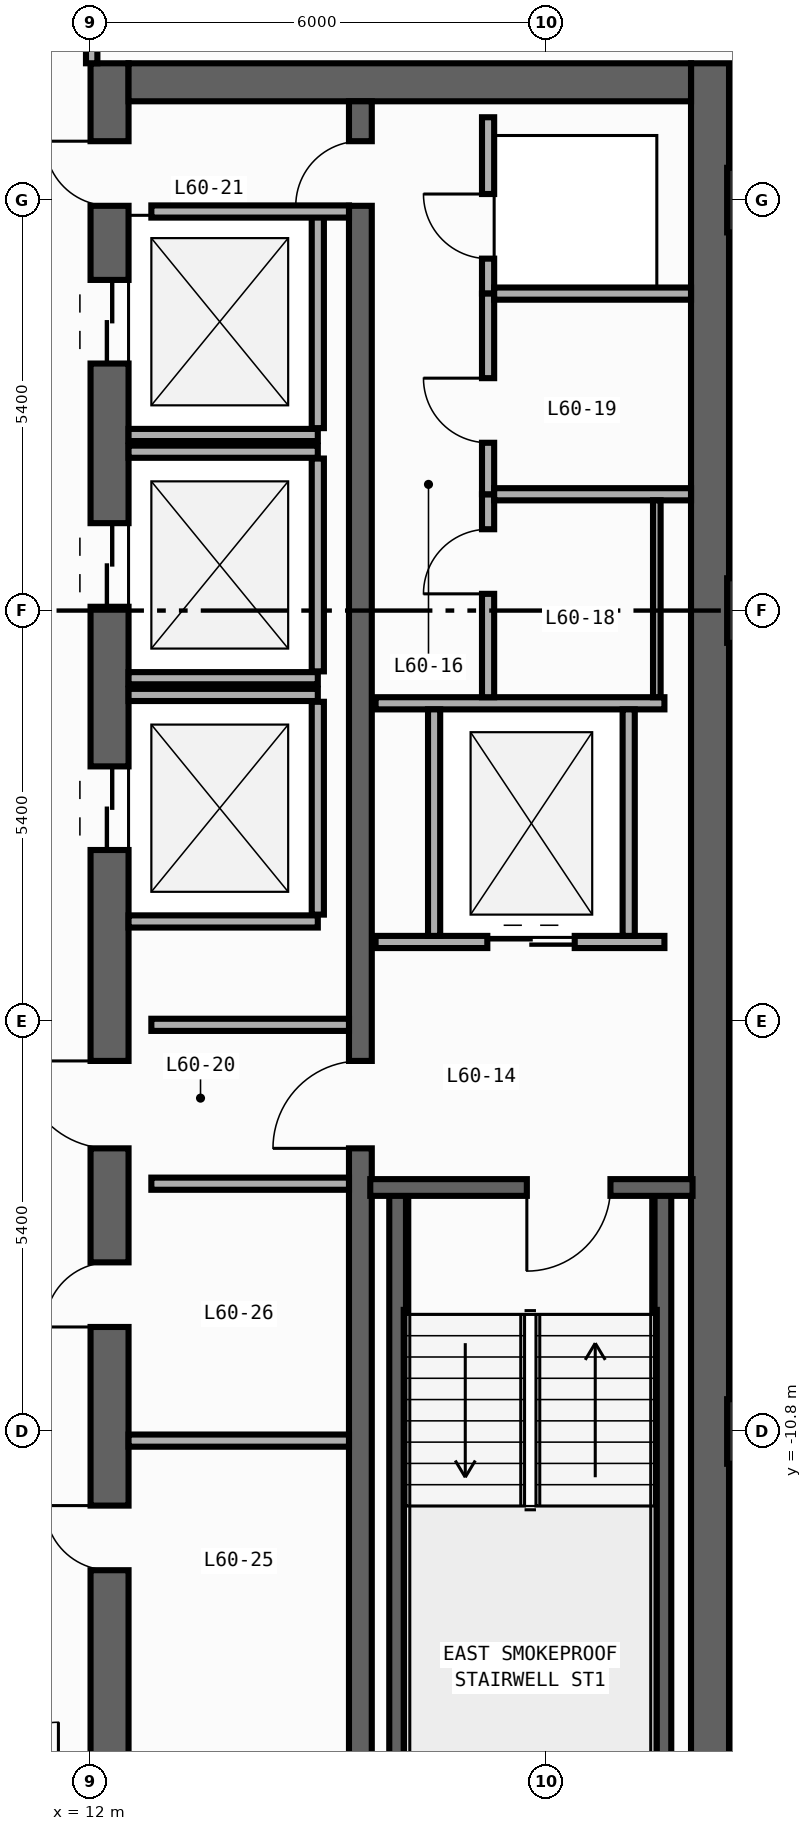
"""IFC4 building model, lengths in metres.
Left out: names, types, materials, properties, quantities, classifications, styles, units other than length and angle.
Written with IfcOpenShell. Run it as: python <this file> out.ifc"""

import sys

from ifc_helpers import new_model, si_unit, direction, frame, frame_2d, origin, origin_2d, place, context, subcontext, project, spatial, rectangle, extrude, element, fill, save


model = new_model("IFC4")
c1 = context("Model", 3, precision=1e-05, world=origin(), true_north=direction((0.0, 1.0)))
c2 = subcontext(c1, "Body", "Model", "MODEL_VIEW")
j1 = project(units=[si_unit("LENGTHUNIT", "METRE"), si_unit("PLANEANGLEUNIT", "RADIAN")], contexts=[c1])
p1 = place(None, origin())
s1 = spatial("IfcSite", under=j1, at=p1, CompositionType="ELEMENT")
p2 = place(p1, origin())
s2 = spatial("IfcBuilding", under=s1, at=p2, CompositionType="ELEMENT")
p3 = place(p2, frame((0.0, 0.0, 254.8)))
s3 = spatial("IfcBuildingStorey", under=s2, at=p3, CompositionType="ELEMENT", Elevation=254.8)
p4 = place(p3, frame((12.25, -19.8, 0.0), z_axis=(0.0, 0.0, 1.0), x_axis=(0.0, 1.0, 0.0)))
e1 = element("IfcWall", 1, at=p4, inside=s3, PredefinedType="SHEAR", context=c2, shape_type="SweptSolid", body=[
    extrude(rectangle(XDim=27.0, YDim=0.5, at=frame_2d((13.5, 0.0))), origin(), (0.0, 0.0, 1.0), 3.34),
])
p5 = place(p4, frame((23.05, 0.0, 0.0)))
e2 = element("IfcOpeningElement", 2, at=p5, cuts=e1, PredefinedType="OPENING", context=c2, shape_type="SweptSolid", body=[
    extrude(rectangle(XDim=1.1, YDim=2.2, at=frame_2d((0.55, 1.1))), frame((0.0, 0.26, 0.0), z_axis=(0.0, -1.0, 0.0), x_axis=(1.0, 0.0, 0.0)), (0.0, 0.0, 1.0), 0.52),
])
p6 = place(p4, frame((19.85, 0.0, 0.0)))
e3 = element("IfcOpeningElement", 3, at=p6, cuts=e1, PredefinedType="OPENING", context=c2, shape_type="SweptSolid", body=[
    extrude(rectangle(XDim=1.1, YDim=2.2, at=frame_2d((0.55, 1.1))), frame((0.0, 0.26, 0.0), z_axis=(0.0, -1.0, 0.0), x_axis=(1.0, 0.0, 0.0)), (0.0, 0.0, 1.0), 0.52),
])
p7 = place(p4, frame((16.65, 0.0, 0.0)))
e4 = element("IfcOpeningElement", 4, at=p7, cuts=e1, PredefinedType="OPENING", context=c2, shape_type="SweptSolid", body=[
    extrude(rectangle(XDim=1.1, YDim=2.2, at=frame_2d((0.55, 1.1))), frame((0.0, 0.26, 0.0), z_axis=(0.0, -1.0, 0.0), x_axis=(1.0, 0.0, 0.0)), (0.0, 0.0, 1.0), 0.52),
])
p8 = place(p4, frame((7.175, 0.0, 0.0)))
e5 = element("IfcOpeningElement", 5, at=p8, cuts=e1, PredefinedType="OPENING", context=c2, shape_type="SweptSolid", body=[
    extrude(rectangle(XDim=0.85, YDim=2.1, at=frame_2d((0.425, 1.05))), frame((0.0, 0.26, 0.0), z_axis=(0.0, -1.0, 0.0), x_axis=(1.0, 0.0, 0.0)), (0.0, 0.0, 1.0), 0.52),
])
p9 = place(p4, frame((10.375, 0.0, 0.0)))
e6 = element("IfcOpeningElement", 6, at=p9, cuts=e1, PredefinedType="OPENING", context=c2, shape_type="SweptSolid", body=[
    extrude(rectangle(XDim=0.85, YDim=2.1, at=frame_2d((0.425, 1.05))), frame((0.0, 0.26, 0.0), z_axis=(0.0, -1.0, 0.0), x_axis=(1.0, 0.0, 0.0)), (0.0, 0.0, 1.0), 0.52),
])
p10 = place(p4, frame((12.725, 0.0, 0.0)))
e7 = element("IfcOpeningElement", 7, at=p10, cuts=e1, PredefinedType="OPENING", context=c2, shape_type="SweptSolid", body=[
    extrude(rectangle(XDim=1.15, YDim=2.2, at=frame_2d((0.575, 1.1))), frame((0.0, 0.26, 0.0), z_axis=(0.0, -1.0, 0.0), x_axis=(1.0, 0.0, 0.0)), (0.0, 0.0, 1.0), 0.52),
])
p11 = place(p4, frame((25.125, 0.0, 0.0)))
e8 = element("IfcOpeningElement", 8, at=p11, cuts=e1, PredefinedType="OPENING", context=c2, shape_type="SweptSolid", body=[
    extrude(rectangle(XDim=0.85, YDim=2.1, at=frame_2d((0.425, 1.05))), frame((0.0, 0.26, 0.0), z_axis=(0.0, -1.0, 0.0), x_axis=(1.0, 0.0, 0.0)), (0.0, 0.0, 1.0), 0.52),
])
p12 = place(p3, frame((20.15, -19.8, 0.0), z_axis=(0.0, 0.0, 1.0), x_axis=(0.0, 1.0, 0.0)))
e9 = element("IfcWall", 9, at=p12, inside=s3, PredefinedType="SHEAR", context=c2, shape_type="SweptSolid", body=[
    extrude(rectangle(XDim=27.0, YDim=0.5, at=frame_2d((13.5, 0.0))), origin(), (0.0, 0.0, 1.0), 3.34),
])
p13 = place(p3, frame((12.5, 6.95, 0.0), z_axis=(0.0, 0.0, 1.0), x_axis=(1.0, 0.0, 0.0)))
e10 = element("IfcWall", 10, at=p13, inside=s3, PredefinedType="SHEAR", context=c2, shape_type="SweptSolid", body=[
    extrude(rectangle(XDim=7.4, YDim=0.5, at=frame_2d((3.7, 0.0))), origin(), (0.0, 0.0, 1.0), 3.34),
])
p14 = place(p3, frame((15.55, -19.3, 0.0), z_axis=(0.0, 0.0, 1.0), x_axis=(0.0, 1.0, 0.0)))
e11 = element("IfcWall", 11, at=p14, inside=s3, PredefinedType="SHEAR", context=c2, shape_type="SweptSolid", body=[
    extrude(rectangle(XDim=26.0, YDim=0.3, at=frame_2d((13.0, 0.0))), origin(), (0.0, 0.0, 1.0), 3.34),
])
p15 = place(p14, frame((12.225, 0.0, 0.0)))
e12 = element("IfcOpeningElement", 12, at=p15, cuts=e11, PredefinedType="OPENING", context=c2, shape_type="SweptSolid", body=[
    extrude(rectangle(XDim=1.15, YDim=2.2, at=frame_2d((0.575, 1.1))), frame((0.0, 0.16, 0.0), z_axis=(0.0, -1.0, 0.0), x_axis=(1.0, 0.0, 0.0)), (0.0, 0.0, 1.0), 0.32),
])
p16 = place(p14, frame((24.625, 0.0, 0.0)))
e13 = element("IfcOpeningElement", 13, at=p16, cuts=e11, PredefinedType="OPENING", context=c2, shape_type="SweptSolid", body=[
    extrude(rectangle(XDim=0.85, YDim=2.1, at=frame_2d((0.425, 1.05))), frame((0.0, 0.16, 0.0), z_axis=(0.0, -1.0, 0.0), x_axis=(1.0, 0.0, 0.0)), (0.0, 0.0, 1.0), 0.32),
])
for number, where, z_axis, x_axis in (
    (14, (16.04, -19.01, 0.0), (0.0, 0.0, 1.0), (0.0, 1.0, 0.0)),
    (15, (19.53, -19.01, 0.0), (0.0, 0.0, 1.0), (0.0, 1.0, 0.0)),
):
    element("IfcWall", number, at=place(p3, frame(where, z_axis=z_axis, x_axis=x_axis)), inside=s3, PredefinedType="SHEAR", context=c2, shape_type="SweptSolid", body=[
        extrude(rectangle(XDim=11.42, YDim=0.22, at=frame_2d((5.71, 0.0))), origin(), (0.0, 0.0, 1.0), 3.34),
    ])
p17 = place(p3, frame((19.92, -7.59, 0.0), z_axis=(0.0, 0.0, 1.0), x_axis=(-1.0, 0.0, 0.0)))
e16 = element("IfcWall", 16, at=p17, inside=s3, PredefinedType="SHEAR", context=c2, shape_type="SweptSolid", body=[
    extrude(rectangle(XDim=4.24, YDim=0.22, at=frame_2d((2.12, 0.0))), origin(), (0.0, 0.0, 1.0), 3.34),
])
p18 = place(p17, frame((1.08, 0.0, 0.0)))
e17 = element("IfcOpeningElement", 17, at=p18, cuts=e16, PredefinedType="OPENING", context=c2, shape_type="SweptSolid", body=[
    extrude(rectangle(XDim=1.1, YDim=2.2, at=frame_2d((0.55, 1.1))), frame((0.0, 0.12, 0.0), z_axis=(0.0, -1.0, 0.0), x_axis=(1.0, 0.0, 0.0)), (0.0, 0.0, 1.0), 0.24),
])
for number, where, z_axis, x_axis in (
    (18, (20.8, -10.8, 0.0), (0.0, 0.0, 1.0), (1.0, 0.0, 0.0)),
    (19, (20.8, 0.0, 0.0), (0.0, 0.0, 1.0), (1.0, 0.0, 0.0)),
    (20, (20.8, 5.4, 0.0), (0.0, 0.0, 1.0), (1.0, 0.0, 0.0)),
):
    element("IfcColumn", number, at=place(p3, frame(where, z_axis=z_axis, x_axis=x_axis)), inside=s3, PredefinedType="COLUMN", context=c2, shape_type="SweptSolid", body=[
        extrude(rectangle(XDim=0.85, YDim=0.85, at=origin_2d()), origin(), (0.0, 0.0, 1.0), 3.6),
    ])
p19 = place(p3, frame((12.5, 2.31, 0.0), z_axis=(0.0, 0.0, 1.0), x_axis=(1.0, 0.0, 0.0)))
e21 = element("IfcWall", 21, at=p19, inside=s3, PredefinedType="STANDARD", context=c2, shape_type="SweptSolid", body=[
    extrude(rectangle(XDim=2.49, YDim=0.16, at=frame_2d((1.245, 0.0))), origin(), (0.0, 0.0, 1.0), 3.34),
])
p20 = place(p3, frame((14.99, 2.4, 0.0), z_axis=(0.0, 0.0, 1.0), x_axis=(0.0, 1.0, 0.0)))
e22 = element("IfcWall", 22, at=p20, inside=s3, PredefinedType="STANDARD", context=c2, shape_type="SweptSolid", body=[
    extrude(rectangle(XDim=2.8, YDim=0.16, at=frame_2d((1.4, 0.0))), origin(), (0.0, 0.0, 1.0), 3.34),
])
for number, where, z_axis, x_axis in (
    (23, (12.5, -0.89, 0.0), (0.0, 0.0, 1.0), (1.0, 0.0, 0.0)),
    (24, (12.5, 2.09, 0.0), (0.0, 0.0, 1.0), (1.0, 0.0, 0.0)),
):
    element("IfcWall", number, at=place(p3, frame(where, z_axis=z_axis, x_axis=x_axis)), inside=s3, PredefinedType="STANDARD", context=c2, shape_type="SweptSolid", body=[
        extrude(rectangle(XDim=2.49, YDim=0.16, at=frame_2d((1.245, 0.0))), origin(), (0.0, 0.0, 1.0), 3.34),
    ])
p21 = place(p3, frame((14.99, -0.8, 0.0), z_axis=(0.0, 0.0, 1.0), x_axis=(0.0, 1.0, 0.0)))
e25 = element("IfcWall", 25, at=p21, inside=s3, PredefinedType="STANDARD", context=c2, shape_type="SweptSolid", body=[
    extrude(rectangle(XDim=2.8, YDim=0.16, at=frame_2d((1.4, 0.0))), origin(), (0.0, 0.0, 1.0), 3.34),
])
for number, where, z_axis, x_axis in (
    (26, (12.5, -4.09, 0.0), (0.0, 0.0, 1.0), (1.0, 0.0, 0.0)),
    (27, (12.5, -1.11, 0.0), (0.0, 0.0, 1.0), (1.0, 0.0, 0.0)),
):
    element("IfcWall", number, at=place(p3, frame(where, z_axis=z_axis, x_axis=x_axis)), inside=s3, PredefinedType="STANDARD", context=c2, shape_type="SweptSolid", body=[
        extrude(rectangle(XDim=2.49, YDim=0.16, at=frame_2d((1.245, 0.0))), origin(), (0.0, 0.0, 1.0), 3.34),
    ])
p22 = place(p3, frame((14.99, -4.0, 0.0), z_axis=(0.0, 0.0, 1.0), x_axis=(0.0, 1.0, 0.0)))
e28 = element("IfcWall", 28, at=p22, inside=s3, PredefinedType="STANDARD", context=c2, shape_type="SweptSolid", body=[
    extrude(rectangle(XDim=2.8, YDim=0.16, at=frame_2d((1.4, 0.0))), origin(), (0.0, 0.0, 1.0), 3.34),
])
p23 = place(p3, frame((15.75, -4.36, 0.0), z_axis=(0.0, 0.0, 1.0), x_axis=(1.0, 0.0, 0.0)))
e29 = element("IfcWall", 29, at=p23, inside=s3, PredefinedType="STANDARD", context=c2, shape_type="SweptSolid", body=[
    extrude(rectangle(XDim=3.8, YDim=0.16, at=frame_2d((1.9, 0.0))), origin(), (0.0, 0.0, 1.0), 3.34),
])
p24 = place(p23, frame((1.47, 0.0, 0.0)))
e30 = element("IfcOpeningElement", 30, at=p24, cuts=e29, PredefinedType="OPENING", context=c2, shape_type="SweptSolid", body=[
    extrude(rectangle(XDim=1.15, YDim=2.2, at=frame_2d((0.575, 1.1))), frame((0.0, 0.09, 0.0), z_axis=(0.0, -1.0, 0.0), x_axis=(1.0, 0.0, 0.0)), (0.0, 0.0, 1.0), 0.18),
])
p25 = place(p3, frame((15.75, -1.22, 0.0), z_axis=(0.0, 0.0, 1.0), x_axis=(1.0, 0.0, 0.0)))
e31 = element("IfcWall", 31, at=p25, inside=s3, PredefinedType="STANDARD", context=c2, shape_type="SweptSolid", body=[
    extrude(rectangle(XDim=3.8, YDim=0.16, at=frame_2d((1.9, 0.0))), origin(), (0.0, 0.0, 1.0), 3.34),
])
for number, where, z_axis, x_axis in (
    (32, (16.52, -4.28, 0.0), (0.0, 0.0, 1.0), (0.0, 1.0, 0.0)),
    (33, (19.08, -4.28, 0.0), (0.0, 0.0, 1.0), (0.0, 1.0, 0.0)),
):
    element("IfcWall", number, at=place(p3, frame(where, z_axis=z_axis, x_axis=x_axis)), inside=s3, PredefinedType="STANDARD", context=c2, shape_type="SweptSolid", body=[
        extrude(rectangle(XDim=2.98, YDim=0.16, at=frame_2d((1.49, 0.0))), origin(), (0.0, 0.0, 1.0), 3.34),
    ])
for number, where, z_axis, x_axis in (
    (34, (12.8, -5.45, 0.0), (0.0, 0.0, 1.0), (1.0, 0.0, 0.0)),
    (35, (12.8, -7.54, 0.0), (0.0, 0.0, 1.0), (1.0, 0.0, 0.0)),
    (36, (12.8, 5.25, 0.0), (0.0, 0.0, 1.0), (1.0, 0.0, 0.0)),
):
    element("IfcWall", number, at=place(p3, frame(where, z_axis=z_axis, x_axis=x_axis)), inside=s3, PredefinedType="STANDARD", context=c2, shape_type="SweptSolid", body=[
        extrude(rectangle(XDim=2.6, YDim=0.16, at=frame_2d((1.3, 0.0))), origin(), (0.0, 0.0, 1.0), 3.34),
    ])
p26 = place(p3, frame((17.23, 4.17, 0.0), z_axis=(0.0, 0.0, 1.0), x_axis=(0.0, 1.0, 0.0)))
e37 = element("IfcWall", 37, at=p26, inside=s3, PredefinedType="PARTITIONING", context=c2, shape_type="SweptSolid", body=[
    extrude(rectangle(XDim=2.32, YDim=0.16, at=frame_2d((1.16, 0.0))), origin(), (0.0, 0.0, 1.0), 3.34),
])
p27 = place(p26, frame((0.46, 0.0, 0.0)))
e38 = element("IfcOpeningElement", 38, at=p27, cuts=e37, PredefinedType="OPENING", context=c2, shape_type="SweptSolid", body=[
    extrude(rectangle(XDim=0.85, YDim=2.1, at=frame_2d((0.425, 1.05))), frame((0.0, 0.09, 0.0), z_axis=(0.0, -1.0, 0.0), x_axis=(1.0, 0.0, 0.0)), (0.0, 0.0, 1.0), 0.18),
])
p28 = place(p3, frame((17.23, -1.14, 0.0), z_axis=(0.0, 0.0, 1.0), x_axis=(0.0, 1.0, 0.0)))
e39 = element("IfcWall", 39, at=p28, inside=s3, PredefinedType="PARTITIONING", context=c2, shape_type="SweptSolid", body=[
    extrude(rectangle(XDim=2.67, YDim=0.16, at=frame_2d((1.335, 0.0))), origin(), (0.0, 0.0, 1.0), 3.34),
])
p29 = place(p28, frame((1.36, 0.0, 0.0)))
e40 = element("IfcOpeningElement", 40, at=p29, cuts=e39, PredefinedType="OPENING", context=c2, shape_type="SweptSolid", body=[
    extrude(rectangle(XDim=0.85, YDim=2.1, at=frame_2d((0.425, 1.05))), frame((0.0, 0.09, 0.0), z_axis=(0.0, -1.0, 0.0), x_axis=(1.0, 0.0, 0.0)), (0.0, 0.0, 1.0), 0.18),
])
p30 = place(p3, frame((17.23, 1.53, 0.0), z_axis=(0.0, 0.0, 1.0), x_axis=(0.0, 1.0, 0.0)))
e41 = element("IfcWall", 41, at=p30, inside=s3, PredefinedType="PARTITIONING", context=c2, shape_type="SweptSolid", body=[
    extrude(rectangle(XDim=2.64, YDim=0.16, at=frame_2d((1.32, 0.0))), origin(), (0.0, 0.0, 1.0), 3.34),
])
p31 = place(p30, frame((0.677, 0.0, 0.0)))
e42 = element("IfcOpeningElement", 42, at=p31, cuts=e41, PredefinedType="OPENING", context=c2, shape_type="SweptSolid", body=[
    extrude(rectangle(XDim=0.85, YDim=2.1, at=frame_2d((0.425, 1.05))), frame((0.0, 0.09, 0.0), z_axis=(0.0, -1.0, 0.0), x_axis=(1.0, 0.0, 0.0)), (0.0, 0.0, 1.0), 0.18),
])
for number, where, z_axis, x_axis in (
    (43, (17.31, 4.17, 0.0), (0.0, 0.0, 1.0), (1.0, 0.0, 0.0)),
    (44, (17.31, 1.53, 0.0), (0.0, 0.0, 1.0), (1.0, 0.0, 0.0)),
):
    element("IfcWall", number, at=place(p3, frame(where, z_axis=z_axis, x_axis=x_axis)), inside=s3, PredefinedType="PARTITIONING", context=c2, shape_type="SweptSolid", body=[
        extrude(rectangle(XDim=2.59, YDim=0.16, at=frame_2d((1.295, 0.0))), origin(), (0.0, 0.0, 1.0), 3.34),
    ])
p32 = place(p3, frame((12.5, -10.92, 0.0), z_axis=(0.0, 0.0, 1.0), x_axis=(1.0, 0.0, 0.0)))
e45 = element("IfcWall", 45, at=p32, inside=s3, PredefinedType="PARTITIONING", context=c2, shape_type="SweptSolid", body=[
    extrude(rectangle(XDim=2.9, YDim=0.16, at=frame_2d((1.45, 0.0))), origin(), (0.0, 0.0, 1.0), 2.44),
])
p33 = place(p3, frame((12.015, 7.2, 0.0), z_axis=(0.0, 0.0, 1.0), x_axis=(0.0, 1.0, 0.0)))
e46 = element("IfcWall", 46, at=p33, inside=s3, PredefinedType="PARTITIONING", context=c2, shape_type="SweptSolid", body=[
    extrude(rectangle(XDim=6.52, YDim=0.15, at=frame_2d((3.26, 0.0))), origin(), (0.0, 0.0, 1.0), 3.34),
])
p34 = place(p33, frame((0.67, 0.0, 0.0)))
e47 = element("IfcOpeningElement", 47, at=p34, cuts=e46, PredefinedType="OPENING", context=c2, shape_type="SweptSolid", body=[
    extrude(rectangle(XDim=0.9, YDim=2.15, at=frame_2d((0.45, 1.075))), frame((0.0, 0.085, 0.0), z_axis=(0.0, -1.0, 0.0), x_axis=(1.0, 0.0, 0.0)), (0.0, 0.0, 1.0), 0.17),
])
p35 = place(p3, frame((19.45, 1.45, 0.0), z_axis=(0.0, 0.0, 1.0), x_axis=(0.0, -1.0, 0.0)))
e48 = element("IfcWall", 48, at=p35, inside=s3, PredefinedType="PARTITIONING", context=c2, shape_type="SweptSolid", body=[
    extrude(rectangle(XDim=2.59, YDim=0.1, at=frame_2d((1.295, 0.0))), origin(), (0.0, 0.0, 1.0), 3.34),
])
p36 = place(p18, origin())
e49 = element("IfcDoor", 49, at=p36, inside=s3, OperationType="SINGLE_SWING_RIGHT", PredefinedType="DOOR", context=c2, shape_type="SweptSolid", body=[
    extrude(rectangle(XDim=1.1, YDim=2.2, at=frame_2d((0.55, 1.1))), frame((0.0, 0.025, 0.0), z_axis=(0.0, -1.0, 0.0), x_axis=(1.0, 0.0, 0.0)), (0.0, 0.0, 1.0), 0.05),
])
fill(e17, e49)
p37 = place(p5, origin())
e50 = element("IfcDoor", 50, at=p37, inside=s3, OperationType="DOUBLE_DOOR_SLIDING", PredefinedType="DOOR", context=c2, shape_type="SweptSolid", body=[
    extrude(rectangle(XDim=1.1, YDim=2.2, at=frame_2d((0.55, 1.1))), frame((0.0, 0.025, 0.0), z_axis=(0.0, -1.0, 0.0), x_axis=(1.0, 0.0, 0.0)), (0.0, 0.0, 1.0), 0.05),
])
fill(e2, e50)
p38 = place(p6, origin())
e51 = element("IfcDoor", 51, at=p38, inside=s3, OperationType="DOUBLE_DOOR_SLIDING", PredefinedType="DOOR", context=c2, shape_type="SweptSolid", body=[
    extrude(rectangle(XDim=1.1, YDim=2.2, at=frame_2d((0.55, 1.1))), frame((0.0, 0.025, 0.0), z_axis=(0.0, -1.0, 0.0), x_axis=(1.0, 0.0, 0.0)), (0.0, 0.0, 1.0), 0.05),
])
fill(e3, e51)
p39 = place(p7, origin())
e52 = element("IfcDoor", 52, at=p39, inside=s3, OperationType="DOUBLE_DOOR_SLIDING", PredefinedType="DOOR", context=c2, shape_type="SweptSolid", body=[
    extrude(rectangle(XDim=1.1, YDim=2.2, at=frame_2d((0.55, 1.1))), frame((0.0, 0.025, 0.0), z_axis=(0.0, -1.0, 0.0), x_axis=(1.0, 0.0, 0.0)), (0.0, 0.0, 1.0), 0.05),
])
fill(e4, e52)
p40 = place(p8, origin())
e53 = element("IfcDoor", 53, at=p40, inside=s3, OperationType="SINGLE_SWING_RIGHT", PredefinedType="DOOR", context=c2, shape_type="SweptSolid", body=[
    extrude(rectangle(XDim=0.85, YDim=2.1, at=frame_2d((0.425, 1.05))), frame((0.0, 0.025, 0.0), z_axis=(0.0, -1.0, 0.0), x_axis=(1.0, 0.0, 0.0)), (0.0, 0.0, 1.0), 0.05),
])
fill(e5, e53)
p41 = place(p9, origin())
e54 = element("IfcDoor", 54, at=p41, inside=s3, OperationType="SINGLE_SWING_LEFT", PredefinedType="DOOR", context=c2, shape_type="SweptSolid", body=[
    extrude(rectangle(XDim=0.85, YDim=2.1, at=frame_2d((0.425, 1.05))), frame((0.0, 0.025, 0.0), z_axis=(0.0, -1.0, 0.0), x_axis=(1.0, 0.0, 0.0)), (0.0, 0.0, 1.0), 0.05),
])
fill(e6, e54)
p42 = place(p10, origin())
e55 = element("IfcDoor", 55, at=p42, inside=s3, OperationType="SINGLE_SWING_RIGHT", PredefinedType="DOOR", context=c2, shape_type="SweptSolid", body=[
    extrude(rectangle(XDim=1.15, YDim=2.2, at=frame_2d((0.575, 1.1))), frame((0.0, 0.025, 0.0), z_axis=(0.0, -1.0, 0.0), x_axis=(1.0, 0.0, 0.0)), (0.0, 0.0, 1.0), 0.05),
])
fill(e7, e55)
p43 = place(p15, origin())
e56 = element("IfcDoor", 56, at=p43, inside=s3, OperationType="SINGLE_SWING_LEFT", PredefinedType="DOOR", context=c2, shape_type="SweptSolid", body=[
    extrude(rectangle(XDim=1.15, YDim=2.2, at=frame_2d((0.575, 1.1))), frame((0.0, 0.025, 0.0), z_axis=(0.0, -1.0, 0.0), x_axis=(1.0, 0.0, 0.0)), (0.0, 0.0, 1.0), 0.05),
])
fill(e12, e56)
p44 = place(p11, origin())
e57 = element("IfcDoor", 57, at=p44, inside=s3, OperationType="SINGLE_SWING_RIGHT", PredefinedType="DOOR", context=c2, shape_type="SweptSolid", body=[
    extrude(rectangle(XDim=0.85, YDim=2.1, at=frame_2d((0.425, 1.05))), frame((0.0, 0.025, 0.0), z_axis=(0.0, -1.0, 0.0), x_axis=(1.0, 0.0, 0.0)), (0.0, 0.0, 1.0), 0.05),
])
fill(e8, e57)
p45 = place(p16, origin())
e58 = element("IfcDoor", 58, at=p45, inside=s3, OperationType="SINGLE_SWING_LEFT", PredefinedType="DOOR", context=c2, shape_type="SweptSolid", body=[
    extrude(rectangle(XDim=0.85, YDim=2.1, at=frame_2d((0.425, 1.05))), frame((0.0, 0.025, 0.0), z_axis=(0.0, -1.0, 0.0), x_axis=(1.0, 0.0, 0.0)), (0.0, 0.0, 1.0), 0.05),
])
fill(e13, e58)
p46 = place(p24, origin())
e59 = element("IfcDoor", 59, at=p46, inside=s3, OperationType="DOUBLE_DOOR_SLIDING", PredefinedType="DOOR", context=c2, shape_type="SweptSolid", body=[
    extrude(rectangle(XDim=1.15, YDim=2.2, at=frame_2d((0.575, 1.1))), frame((0.0, 0.025, 0.0), z_axis=(0.0, -1.0, 0.0), x_axis=(1.0, 0.0, 0.0)), (0.0, 0.0, 1.0), 0.05),
])
fill(e30, e59)
p47 = place(p27, origin())
e60 = element("IfcDoor", 60, at=p47, inside=s3, OperationType="SINGLE_SWING_RIGHT", PredefinedType="DOOR", context=c2, shape_type="SweptSolid", body=[
    extrude(rectangle(XDim=0.85, YDim=2.1, at=frame_2d((0.425, 1.05))), frame((0.0, 0.025, 0.0), z_axis=(0.0, -1.0, 0.0), x_axis=(1.0, 0.0, 0.0)), (0.0, 0.0, 1.0), 0.05),
])
fill(e38, e60)
p48 = place(p29, origin())
e61 = element("IfcDoor", 61, at=p48, inside=s3, OperationType="SINGLE_SWING_LEFT", PredefinedType="DOOR", context=c2, shape_type="SweptSolid", body=[
    extrude(rectangle(XDim=0.85, YDim=2.1, at=frame_2d((0.425, 1.05))), frame((0.0, 0.025, 0.0), z_axis=(0.0, -1.0, 0.0), x_axis=(1.0, 0.0, 0.0)), (0.0, 0.0, 1.0), 0.05),
])
fill(e40, e61)
p49 = place(p31, origin())
e62 = element("IfcDoor", 62, at=p49, inside=s3, OperationType="SINGLE_SWING_RIGHT", PredefinedType="DOOR", context=c2, shape_type="SweptSolid", body=[
    extrude(rectangle(XDim=0.85, YDim=2.1, at=frame_2d((0.425, 1.05))), frame((0.0, 0.025, 0.0), z_axis=(0.0, -1.0, 0.0), x_axis=(1.0, 0.0, 0.0)), (0.0, 0.0, 1.0), 0.05),
])
fill(e42, e62)
save(model, sys.argv[1])
